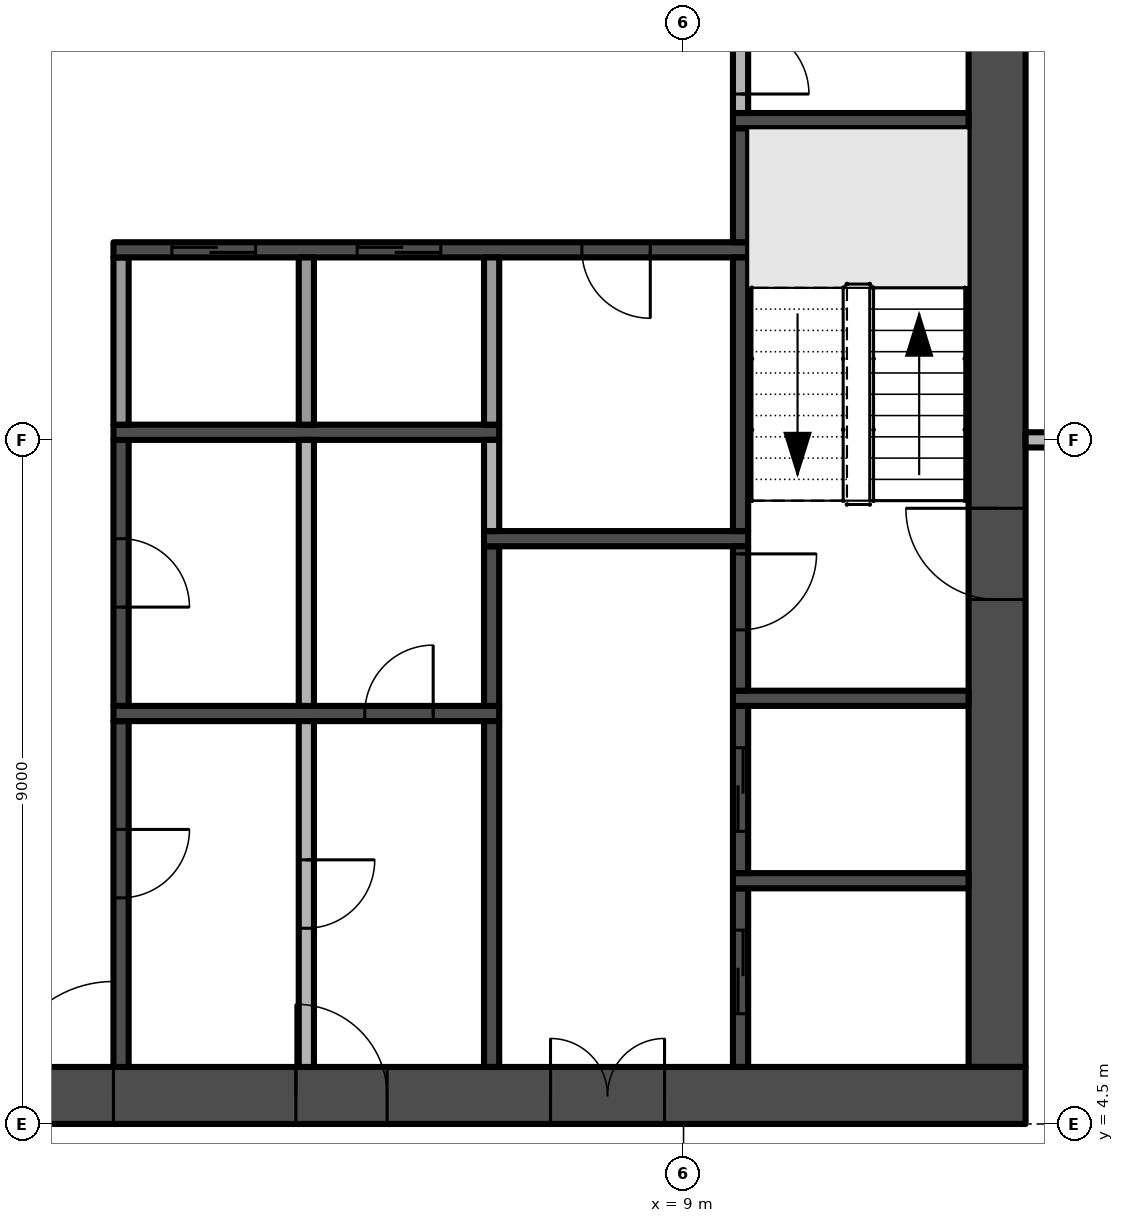
"""IFC4 building model, lengths in metres.
Left out: names, types, materials, properties, quantities, classifications, styles, units other than length and angle.
Written with IfcOpenShell. Run it as: python <this file> out.ifc"""

import sys

from ifc_helpers import new_model, si_unit, direction, frame, frame_2d, origin, place, context, subcontext, project, spatial, rectangle, extrude, element, fill, save


model = new_model("IFC4")
c1 = context("Model", 3, precision=1e-05, world=origin(), true_north=direction((0.0, 1.0)))
c2 = subcontext(c1, "Body", "Model", "MODEL_VIEW")
j1 = project(units=[si_unit("LENGTHUNIT", "METRE"), si_unit("PLANEANGLEUNIT", "RADIAN")], contexts=[c1])
p1 = place(None, origin())
s1 = spatial("IfcSite", under=j1, at=p1, CompositionType="ELEMENT")
p2 = place(p1, origin())
s2 = spatial("IfcBuilding", under=s1, at=p2, CompositionType="ELEMENT")
p3 = place(p2, frame((0.0, 0.0, 144.0)))
s3 = spatial("IfcBuildingStorey", under=s2, at=p3, CompositionType="ELEMENT", Elevation=144.0)
p4 = place(p3, frame((-13.5, 4.875, -0.3), z_axis=(0.0, 0.0, 1.0), x_axis=(1.0, 0.0, 0.0)))
e1 = element("IfcWall", 1, at=p4, inside=s3, PredefinedType="SHEAR", context=c2, shape_type="SweptSolid", body=[
    extrude(rectangle(XDim=27.0, YDim=0.75, at=frame_2d((13.5, 0.0))), origin(), (0.0, 0.0, 1.0), 3.8),
])
p5 = place(p4, frame((12.0, 0.0, 0.3)))
e2 = element("IfcOpeningElement", 2, at=p5, cuts=e1, PredefinedType="OPENING", context=c2, shape_type="SweptSolid", body=[
    extrude(rectangle(XDim=3.0, YDim=2.4, at=frame_2d((1.5, 1.2))), frame((0.0, 0.385, 0.0), z_axis=(0.0, -1.0, 0.0), x_axis=(1.0, 0.0, 0.0)), (0.0, 0.0, 1.0), 0.77),
])
p6 = place(p4, frame((4.9, 0.0, 0.3)))
e3 = element("IfcOpeningElement", 3, at=p6, cuts=e1, PredefinedType="OPENING", context=c2, shape_type="SweptSolid", body=[
    extrude(rectangle(XDim=1.2, YDim=2.2, at=frame_2d((0.6, 1.1))), frame((0.0, 0.385, 0.0), z_axis=(0.0, -1.0, 0.0), x_axis=(1.0, 0.0, 0.0)), (0.0, 0.0, 1.0), 0.77),
])
p7 = place(p4, frame((20.75, 0.0, 0.3)))
e4 = element("IfcOpeningElement", 4, at=p7, cuts=e1, PredefinedType="OPENING", context=c2, shape_type="SweptSolid", body=[
    extrude(rectangle(XDim=1.5, YDim=2.2, at=frame_2d((0.75, 1.1))), frame((0.0, 0.385, 0.0), z_axis=(0.0, -1.0, 0.0), x_axis=(1.0, 0.0, 0.0)), (0.0, 0.0, 1.0), 0.77),
])
p8 = place(p4, frame((17.4, 0.0, 0.3)))
e5 = element("IfcOpeningElement", 5, at=p8, cuts=e1, PredefinedType="OPENING", context=c2, shape_type="SweptSolid", body=[
    extrude(rectangle(XDim=1.2, YDim=2.2, at=frame_2d((0.6, 1.1))), frame((0.0, 0.385, 0.0), z_axis=(0.0, -1.0, 0.0), x_axis=(1.0, 0.0, 0.0)), (0.0, 0.0, 1.0), 0.77),
])
p9 = place(p3, frame((13.125, 5.25, -0.3), z_axis=(0.0, 0.0, 1.0), x_axis=(0.0, 1.0, 0.0)))
e6 = element("IfcWall", 6, at=p9, inside=s3, PredefinedType="SHEAR", context=c2, shape_type="SweptSolid", body=[
    extrude(rectangle(XDim=16.5, YDim=0.75, at=frame_2d((8.25, 0.0))), origin(), (0.0, 0.0, 1.0), 3.8),
])
p10 = place(p9, frame((6.15, 0.0, 0.3)))
e7 = element("IfcOpeningElement", 7, at=p10, cuts=e6, PredefinedType="OPENING", context=c2, shape_type="SweptSolid", body=[
    extrude(rectangle(XDim=1.2, YDim=2.2, at=frame_2d((0.6, 1.1))), frame((0.0, 0.385, 0.0), z_axis=(0.0, -1.0, 0.0), x_axis=(1.0, 0.0, 0.0)), (0.0, 0.0, 1.0), 0.77),
])
p11 = place(p3, frame((1.6, 9.8, 0.0), z_axis=(0.0, 0.0, 1.0), x_axis=(0.0, -1.0, 0.0)))
e8 = element("IfcWall", 8, at=p11, inside=s3, PredefinedType="SHEAR", context=c2, shape_type="SweptSolid", body=[
    extrude(rectangle(XDim=4.55, YDim=0.2, at=frame_2d((2.275, 0.0))), origin(), (0.0, 0.0, 1.0), 3.5),
])
p12 = place(p11, frame((1.425, 0.0, 0.0)))
e9 = element("IfcOpeningElement", 9, at=p12, cuts=e8, PredefinedType="OPENING", context=c2, shape_type="SweptSolid", body=[
    extrude(rectangle(XDim=0.9, YDim=2.1, at=frame_2d((0.45, 1.05))), frame((0.0, 0.11, 0.0), z_axis=(0.0, -1.0, 0.0), x_axis=(1.0, 0.0, 0.0)), (0.0, 0.0, 1.0), 0.22),
])
p13 = place(p3, frame((1.5, 9.9, 0.0), z_axis=(0.0, 0.0, 1.0), x_axis=(1.0, 0.0, 0.0)))
e10 = element("IfcWall", 10, at=p13, inside=s3, PredefinedType="SHEAR", context=c2, shape_type="SweptSolid", body=[
    extrude(rectangle(XDim=5.075, YDim=0.2, at=frame_2d((2.538, 0.0))), origin(), (0.0, 0.0, 1.0), 3.5),
])
p14 = place(p13, frame((3.306, 0.0, 0.0)))
e11 = element("IfcOpeningElement", 11, at=p14, cuts=e10, PredefinedType="OPENING", context=c2, shape_type="SweptSolid", body=[
    extrude(rectangle(XDim=0.9, YDim=2.1, at=frame_2d((0.45, 1.05))), frame((0.0, 0.11, 0.0), z_axis=(0.0, -1.0, 0.0), x_axis=(1.0, 0.0, 0.0)), (0.0, 0.0, 1.0), 0.22),
])
p15 = place(p3, frame((1.6, 13.5, 0.0), z_axis=(0.0, 0.0, 1.0), x_axis=(0.0, -1.0, 0.0)))
e12 = element("IfcWall", 12, at=p15, inside=s3, PredefinedType="SHEAR", context=c2, shape_type="SweptSolid", body=[
    extrude(rectangle(XDim=3.5, YDim=0.2, at=frame_2d((1.75, 0.0))), origin(), (0.0, 0.0, 1.0), 3.5),
])
p16 = place(p15, frame((1.3, 0.0, 0.0)))
e13 = element("IfcOpeningElement", 13, at=p16, cuts=e12, PredefinedType="OPENING", context=c2, shape_type="SweptSolid", body=[
    extrude(rectangle(XDim=0.9, YDim=2.1, at=frame_2d((0.45, 1.05))), frame((0.0, 0.11, 0.0), z_axis=(0.0, -1.0, 0.0), x_axis=(1.0, 0.0, 0.0)), (0.0, 0.0, 1.0), 0.22),
])
p17 = place(p3, frame((1.5, 13.6, 0.0), z_axis=(0.0, 0.0, 1.0), x_axis=(1.0, 0.0, 0.0)))
e14 = element("IfcWall", 14, at=p17, inside=s3, PredefinedType="SHEAR", context=c2, shape_type="SweptSolid", body=[
    extrude(rectangle(XDim=5.075, YDim=0.2, at=frame_2d((2.538, 0.0))), origin(), (0.0, 0.0, 1.0), 3.5),
])
p18 = place(p3, frame((1.6, 13.7, 0.0), z_axis=(0.0, 0.0, 1.0), x_axis=(0.0, 1.0, 0.0)))
e15 = element("IfcWall", 15, at=p18, inside=s3, PredefinedType="PARTITIONING", context=c2, shape_type="SweptSolid", body=[
    extrude(rectangle(XDim=2.2, YDim=0.2, at=frame_2d((1.1, 0.0))), origin(), (0.0, 0.0, 1.0), 3.5),
])
p19 = place(p3, frame((9.85, 16.0, 0.0), z_axis=(0.0, 0.0, 1.0), x_axis=(-1.0, 0.0, 0.0)))
e16 = element("IfcWall", 16, at=p19, inside=s3, PredefinedType="SHEAR", context=c2, shape_type="SweptSolid", body=[
    extrude(rectangle(XDim=8.35, YDim=0.2, at=frame_2d((4.175, 0.0))), origin(), (0.0, 0.0, 1.0), 3.5),
])
p20 = place(p19, frame((6.481, 0.0, 0.0)))
e17 = element("IfcOpeningElement", 17, at=p20, cuts=e16, PredefinedType="OPENING", context=c2, shape_type="SweptSolid", body=[
    extrude(rectangle(XDim=1.1, YDim=2.1, at=frame_2d((0.55, 1.05))), frame((0.0, 0.11, 0.0), z_axis=(0.0, -1.0, 0.0), x_axis=(1.0, 0.0, 0.0)), (0.0, 0.0, 1.0), 0.22),
])
p21 = place(p19, frame((4.044, 0.0, 0.0)))
e18 = element("IfcOpeningElement", 18, at=p21, cuts=e16, PredefinedType="OPENING", context=c2, shape_type="SweptSolid", body=[
    extrude(rectangle(XDim=1.1, YDim=2.1, at=frame_2d((0.55, 1.05))), frame((0.0, 0.11, 0.0), z_axis=(0.0, -1.0, 0.0), x_axis=(1.0, 0.0, 0.0)), (0.0, 0.0, 1.0), 0.22),
])
p22 = place(p19, frame((1.288, 0.0, 0.0)))
e19 = element("IfcOpeningElement", 19, at=p22, cuts=e16, PredefinedType="OPENING", context=c2, shape_type="SweptSolid", body=[
    extrude(rectangle(XDim=0.9, YDim=2.1, at=frame_2d((0.45, 1.05))), frame((0.0, 0.11, 0.0), z_axis=(0.0, -1.0, 0.0), x_axis=(1.0, 0.0, 0.0)), (0.0, 0.0, 1.0), 0.22),
])
p23 = place(p3, frame((4.037, 9.8, 0.0), z_axis=(0.0, 0.0, 1.0), x_axis=(0.0, -1.0, 0.0)))
e20 = element("IfcWall", 20, at=p23, inside=s3, PredefinedType="PARTITIONING", context=c2, shape_type="SweptSolid", body=[
    extrude(rectangle(XDim=4.55, YDim=0.2, at=frame_2d((2.275, 0.0))), origin(), (0.0, 0.0, 1.0), 3.5),
])
p24 = place(p23, frame((1.825, 0.0, 0.0)))
e21 = element("IfcOpeningElement", 21, at=p24, cuts=e20, PredefinedType="OPENING", context=c2, shape_type="SweptSolid", body=[
    extrude(rectangle(XDim=0.9, YDim=2.1, at=frame_2d((0.45, 1.05))), frame((0.0, 0.11, 0.0), z_axis=(0.0, -1.0, 0.0), x_axis=(1.0, 0.0, 0.0)), (0.0, 0.0, 1.0), 0.22),
])
p25 = place(p3, frame((4.037, 10.0, 0.0), z_axis=(0.0, 0.0, 1.0), x_axis=(0.0, 1.0, 0.0)))
e22 = element("IfcWall", 22, at=p25, inside=s3, PredefinedType="PARTITIONING", context=c2, shape_type="SweptSolid", body=[
    extrude(rectangle(XDim=3.5, YDim=0.2, at=frame_2d((1.75, 0.0))), origin(), (0.0, 0.0, 1.0), 3.5),
])
p26 = place(p3, frame((4.037, 13.7, 0.0), z_axis=(0.0, 0.0, 1.0), x_axis=(0.0, 1.0, 0.0)))
e23 = element("IfcWall", 23, at=p26, inside=s3, PredefinedType="PARTITIONING", context=c2, shape_type="SweptSolid", body=[
    extrude(rectangle(XDim=2.2, YDim=0.2, at=frame_2d((1.1, 0.0))), origin(), (0.0, 0.0, 1.0), 3.5),
])
p27 = place(p3, frame((6.475, 5.25, 0.0), z_axis=(0.0, 0.0, 1.0), x_axis=(0.0, 1.0, 0.0)))
e24 = element("IfcWall", 24, at=p27, inside=s3, PredefinedType="SHEAR", context=c2, shape_type="SweptSolid", body=[
    extrude(rectangle(XDim=4.55, YDim=0.2, at=frame_2d((2.275, 0.0))), origin(), (0.0, 0.0, 1.0), 3.5),
])
p28 = place(p3, frame((6.475, 10.0, 0.0), z_axis=(0.0, 0.0, 1.0), x_axis=(0.0, 1.0, 0.0)))
e25 = element("IfcWall", 25, at=p28, inside=s3, PredefinedType="SHEAR", context=c2, shape_type="SweptSolid", body=[
    extrude(rectangle(XDim=2.1, YDim=0.2, at=frame_2d((1.05, 0.0))), origin(), (0.0, 0.0, 1.0), 3.5),
])
p29 = place(p3, frame((6.375, 12.2, 0.0), z_axis=(0.0, 0.0, 1.0), x_axis=(1.0, 0.0, 0.0)))
e26 = element("IfcWall", 26, at=p29, inside=s3, PredefinedType="SHEAR", context=c2, shape_type="SweptSolid", body=[
    extrude(rectangle(XDim=3.475, YDim=0.2, at=frame_2d((1.738, 0.0))), origin(), (0.0, 0.0, 1.0), 3.5),
])
p30 = place(p3, frame((6.475, 12.3, 0.0), z_axis=(0.0, 0.0, 1.0), x_axis=(0.0, 1.0, 0.0)))
e27 = element("IfcWall", 27, at=p30, inside=s3, PredefinedType="PARTITIONING", context=c2, shape_type="SweptSolid", body=[
    extrude(rectangle(XDim=1.2, YDim=0.2, at=frame_2d((0.6, 0.0))), origin(), (0.0, 0.0, 1.0), 3.5),
])
p31 = place(p3, frame((6.475, 13.7, 0.0), z_axis=(0.0, 0.0, 1.0), x_axis=(0.0, 1.0, 0.0)))
e28 = element("IfcWall", 28, at=p31, inside=s3, PredefinedType="PARTITIONING", context=c2, shape_type="SweptSolid", body=[
    extrude(rectangle(XDim=2.2, YDim=0.2, at=frame_2d((1.1, 0.0))), origin(), (0.0, 0.0, 1.0), 3.5),
])
p32 = place(p3, frame((9.75, 5.25, 0.0), z_axis=(0.0, 0.0, 1.0), x_axis=(0.0, 1.0, 0.0)))
e29 = element("IfcWall", 29, at=p32, inside=s3, PredefinedType="SHEAR", context=c2, shape_type="SweptSolid", body=[
    extrude(rectangle(XDim=2.35, YDim=0.2, at=frame_2d((1.175, 0.0))), origin(), (0.0, 0.0, 1.0), 3.5),
])
p33 = place(p32, frame((0.7, 0.0, 0.0)))
e30 = element("IfcOpeningElement", 30, at=p33, cuts=e29, PredefinedType="OPENING", context=c2, shape_type="SweptSolid", body=[
    extrude(rectangle(XDim=1.1, YDim=2.1, at=frame_2d((0.55, 1.05))), frame((0.0, 0.11, 0.0), z_axis=(0.0, -1.0, 0.0), x_axis=(1.0, 0.0, 0.0)), (0.0, 0.0, 1.0), 0.22),
])
p34 = place(p3, frame((9.65, 7.7, 0.0), z_axis=(0.0, 0.0, 1.0), x_axis=(1.0, 0.0, 0.0)))
e31 = element("IfcWall", 31, at=p34, inside=s3, PredefinedType="SHEAR", context=c2, shape_type="SweptSolid", body=[
    extrude(rectangle(XDim=3.1, YDim=0.2, at=frame_2d((1.55, 0.0))), origin(), (0.0, 0.0, 1.0), 3.5),
])
p35 = place(p3, frame((9.75, 7.8, 0.0), z_axis=(0.0, 0.0, 1.0), x_axis=(0.0, 1.0, 0.0)))
e32 = element("IfcWall", 32, at=p35, inside=s3, PredefinedType="SHEAR", context=c2, shape_type="SweptSolid", body=[
    extrude(rectangle(XDim=2.2, YDim=0.2, at=frame_2d((1.1, 0.0))), origin(), (0.0, 0.0, 1.0), 3.5),
])
p36 = place(p35, frame((0.55, 0.0, 0.0)))
e33 = element("IfcOpeningElement", 33, at=p36, cuts=e32, PredefinedType="OPENING", context=c2, shape_type="SweptSolid", body=[
    extrude(rectangle(XDim=1.1, YDim=2.1, at=frame_2d((0.55, 1.05))), frame((0.0, 0.11, 0.0), z_axis=(0.0, -1.0, 0.0), x_axis=(1.0, 0.0, 0.0)), (0.0, 0.0, 1.0), 0.22),
])
p37 = place(p3, frame((9.65, 10.1, 0.0), z_axis=(0.0, 0.0, 1.0), x_axis=(1.0, 0.0, 0.0)))
e34 = element("IfcWall", 34, at=p37, inside=s3, PredefinedType="SHEAR", context=c2, shape_type="SweptSolid", body=[
    extrude(rectangle(XDim=3.1, YDim=0.2, at=frame_2d((1.55, 0.0))), origin(), (0.0, 0.0, 1.0), 3.5),
])
p38 = place(p3, frame((9.75, 12.1, 0.0), z_axis=(0.0, 0.0, 1.0), x_axis=(0.0, -1.0, 0.0)))
e35 = element("IfcWall", 35, at=p38, inside=s3, PredefinedType="SHEAR", context=c2, shape_type="SweptSolid", body=[
    extrude(rectangle(XDim=1.9, YDim=0.2, at=frame_2d((0.95, 0.0))), origin(), (0.0, 0.0, 1.0), 3.5),
])
p39 = place(p38, frame((0.1, 0.0, 0.0)))
e36 = element("IfcOpeningElement", 36, at=p39, cuts=e35, PredefinedType="OPENING", context=c2, shape_type="SweptSolid", body=[
    extrude(rectangle(XDim=1.0, YDim=2.2, at=frame_2d((0.5, 1.1))), frame((0.0, 0.11, 0.0), z_axis=(0.0, -1.0, 0.0), x_axis=(1.0, 0.0, 0.0)), (0.0, 0.0, 1.0), 0.22),
])
p40 = place(p3, frame((9.75, 12.3, 0.0), z_axis=(0.0, 0.0, 1.0), x_axis=(0.0, 1.0, 0.0)))
e37 = element("IfcWall", 37, at=p40, inside=s3, PredefinedType="SHEAR", context=c2, shape_type="SweptSolid", body=[
    extrude(rectangle(XDim=3.6, YDim=0.2, at=frame_2d((1.8, 0.0))), origin(), (0.0, 0.0, 1.0), 3.5),
])
p41 = place(p3, frame((9.75, 16.1, 0.0), z_axis=(0.0, 0.0, 1.0), x_axis=(0.0, 1.0, 0.0)))
e38 = element("IfcWall", 38, at=p41, inside=s3, PredefinedType="SHEAR", context=c2, shape_type="SweptSolid", body=[
    extrude(rectangle(XDim=1.5, YDim=0.2, at=frame_2d((0.75, 0.0))), origin(), (0.0, 0.0, 1.0), 3.5),
])
p42 = place(p3, frame((9.65, 17.7, 0.0), z_axis=(0.0, 0.0, 1.0), x_axis=(1.0, 0.0, 0.0)))
e39 = element("IfcWall", 39, at=p42, inside=s3, PredefinedType="SHEAR", context=c2, shape_type="SweptSolid", body=[
    extrude(rectangle(XDim=3.1, YDim=0.2, at=frame_2d((1.55, 0.0))), origin(), (0.0, 0.0, 1.0), 3.5),
])
p43 = place(p3, frame((9.75, 19.2, 0.0), z_axis=(0.0, 0.0, 1.0), x_axis=(0.0, -1.0, 0.0)))
e40 = element("IfcWall", 40, at=p43, inside=s3, PredefinedType="PARTITIONING", context=c2, shape_type="SweptSolid", body=[
    extrude(rectangle(XDim=1.4, YDim=0.2, at=frame_2d((0.7, 0.0))), origin(), (0.0, 0.0, 1.0), 3.5),
])
p44 = place(p43, frame((0.25, 0.0, 0.0)))
e41 = element("IfcOpeningElement", 41, at=p44, cuts=e40, PredefinedType="OPENING", context=c2, shape_type="SweptSolid", body=[
    extrude(rectangle(XDim=0.9, YDim=2.1, at=frame_2d((0.45, 1.05))), frame((0.0, 0.11, 0.0), z_axis=(0.0, -1.0, 0.0), x_axis=(1.0, 0.0, 0.0)), (0.0, 0.0, 1.0), 0.22),
])
p45 = place(p3, frame((13.5, 13.5, 0.0), z_axis=(0.0, 0.0, 1.0), x_axis=(1.0, 0.0, 0.0)))
e42 = element("IfcWall", 42, at=p45, inside=s3, PredefinedType="PARTITIONING", context=c2, shape_type="SweptSolid", body=[
    extrude(rectangle(XDim=3.875, YDim=0.2, at=frame_2d((1.938, 0.0))), origin(), (0.0, 0.0, 1.0), 3.5),
])
p46 = place(p45, frame((1.6, 0.0, 0.0)))
e43 = element("IfcOpeningElement", 43, at=p46, cuts=e42, PredefinedType="OPENING", context=c2, shape_type="SweptSolid", body=[
    extrude(rectangle(XDim=0.9, YDim=2.1, at=frame_2d((0.45, 1.05))), frame((0.0, 0.11, 0.0), z_axis=(0.0, -1.0, 0.0), x_axis=(1.0, 0.0, 0.0)), (0.0, 0.0, 1.0), 0.22),
])
p47 = place(p5, frame((3.0, 0.0, 0.0), z_axis=(0.0, 0.0, 1.0), x_axis=(-1.0, 0.0, 0.0)))
e44 = element("IfcDoor", 44, at=p47, inside=s3, OperationType="DOUBLE_DOOR_SINGLE_SWING", PredefinedType="DOOR", context=c2, shape_type="SweptSolid", body=[
    extrude(rectangle(XDim=3.0, YDim=2.4, at=frame_2d((1.5, 1.2))), frame((0.0, 0.025, 0.0), z_axis=(0.0, -1.0, 0.0), x_axis=(1.0, 0.0, 0.0)), (0.0, 0.0, 1.0), 0.05),
])
fill(e2, e44)
p48 = place(p10, frame((1.2, 0.0, 0.0), z_axis=(0.0, 0.0, 1.0), x_axis=(-1.0, 0.0, 0.0)))
e45 = element("IfcDoor", 45, at=p48, inside=s3, OperationType="SINGLE_SWING_LEFT", PredefinedType="DOOR", context=c2, shape_type="SweptSolid", body=[
    extrude(rectangle(XDim=1.2, YDim=2.2, at=frame_2d((0.6, 1.1))), frame((0.0, 0.025, 0.0), z_axis=(0.0, -1.0, 0.0), x_axis=(1.0, 0.0, 0.0)), (0.0, 0.0, 1.0), 0.05),
])
fill(e7, e45)
p49 = place(p7, frame((1.5, 0.0, 0.0), z_axis=(0.0, 0.0, 1.0), x_axis=(-1.0, 0.0, 0.0)))
e46 = element("IfcDoor", 46, at=p49, inside=s3, OperationType="DOUBLE_DOOR_SINGLE_SWING", PredefinedType="DOOR", context=c2, shape_type="SweptSolid", body=[
    extrude(rectangle(XDim=1.5, YDim=2.2, at=frame_2d((0.75, 1.1))), frame((0.0, 0.025, 0.0), z_axis=(0.0, -1.0, 0.0), x_axis=(1.0, 0.0, 0.0)), (0.0, 0.0, 1.0), 0.05),
])
fill(e4, e46)
p50 = place(p8, frame((1.2, 0.0, 0.0), z_axis=(0.0, 0.0, 1.0), x_axis=(-1.0, 0.0, 0.0)))
e47 = element("IfcDoor", 47, at=p50, inside=s3, OperationType="SINGLE_SWING_RIGHT", PredefinedType="DOOR", context=c2, shape_type="SweptSolid", body=[
    extrude(rectangle(XDim=1.2, YDim=2.2, at=frame_2d((0.6, 1.1))), frame((0.0, 0.025, 0.0), z_axis=(0.0, -1.0, 0.0), x_axis=(1.0, 0.0, 0.0)), (0.0, 0.0, 1.0), 0.05),
])
fill(e5, e47)
p51 = place(p39, origin())
e48 = element("IfcDoor", 48, at=p51, inside=s3, OperationType="SINGLE_SWING_LEFT", PredefinedType="DOOR", context=c2, shape_type="SweptSolid", body=[
    extrude(rectangle(XDim=1.0, YDim=2.2, at=frame_2d((0.5, 1.1))), frame((0.0, 0.025, 0.0), z_axis=(0.0, -1.0, 0.0), x_axis=(1.0, 0.0, 0.0)), (0.0, 0.0, 1.0), 0.05),
])
fill(e36, e48)
p52 = place(p20, origin())
e49 = element("IfcDoor", 49, at=p52, inside=s3, OperationType="SLIDING_TO_RIGHT", PredefinedType="DOOR", context=c2, shape_type="SweptSolid", body=[
    extrude(rectangle(XDim=1.1, YDim=2.1, at=frame_2d((0.55, 1.05))), frame((0.0, 0.025, 0.0), z_axis=(0.0, -1.0, 0.0), x_axis=(1.0, 0.0, 0.0)), (0.0, 0.0, 1.0), 0.05),
])
fill(e17, e49)
p53 = place(p21, origin())
e50 = element("IfcDoor", 50, at=p53, inside=s3, OperationType="SLIDING_TO_RIGHT", PredefinedType="DOOR", context=c2, shape_type="SweptSolid", body=[
    extrude(rectangle(XDim=1.1, YDim=2.1, at=frame_2d((0.55, 1.05))), frame((0.0, 0.025, 0.0), z_axis=(0.0, -1.0, 0.0), x_axis=(1.0, 0.0, 0.0)), (0.0, 0.0, 1.0), 0.05),
])
fill(e18, e50)
p54 = place(p33, origin())
e51 = element("IfcDoor", 51, at=p54, inside=s3, OperationType="SLIDING_TO_RIGHT", PredefinedType="DOOR", context=c2, shape_type="SweptSolid", body=[
    extrude(rectangle(XDim=1.1, YDim=2.1, at=frame_2d((0.55, 1.05))), frame((0.0, 0.025, 0.0), z_axis=(0.0, -1.0, 0.0), x_axis=(1.0, 0.0, 0.0)), (0.0, 0.0, 1.0), 0.05),
])
fill(e30, e51)
p55 = place(p36, origin())
e52 = element("IfcDoor", 52, at=p55, inside=s3, OperationType="SLIDING_TO_RIGHT", PredefinedType="DOOR", context=c2, shape_type="SweptSolid", body=[
    extrude(rectangle(XDim=1.1, YDim=2.1, at=frame_2d((0.55, 1.05))), frame((0.0, 0.025, 0.0), z_axis=(0.0, -1.0, 0.0), x_axis=(1.0, 0.0, 0.0)), (0.0, 0.0, 1.0), 0.05),
])
fill(e33, e52)
p56 = place(p12, origin())
e53 = element("IfcDoor", 53, at=p56, inside=s3, OperationType="SINGLE_SWING_LEFT", PredefinedType="DOOR", context=c2, shape_type="SweptSolid", body=[
    extrude(rectangle(XDim=0.9, YDim=2.1, at=frame_2d((0.45, 1.05))), frame((0.0, 0.025, 0.0), z_axis=(0.0, -1.0, 0.0), x_axis=(1.0, 0.0, 0.0)), (0.0, 0.0, 1.0), 0.05),
])
fill(e9, e53)
p57 = place(p24, origin())
e54 = element("IfcDoor", 54, at=p57, inside=s3, OperationType="SINGLE_SWING_LEFT", PredefinedType="DOOR", context=c2, shape_type="SweptSolid", body=[
    extrude(rectangle(XDim=0.9, YDim=2.1, at=frame_2d((0.45, 1.05))), frame((0.0, 0.025, 0.0), z_axis=(0.0, -1.0, 0.0), x_axis=(1.0, 0.0, 0.0)), (0.0, 0.0, 1.0), 0.05),
])
fill(e21, e54)
p58 = place(p16, origin())
e55 = element("IfcDoor", 55, at=p58, inside=s3, OperationType="SINGLE_SWING_RIGHT", PredefinedType="DOOR", context=c2, shape_type="SweptSolid", body=[
    extrude(rectangle(XDim=0.9, YDim=2.1, at=frame_2d((0.45, 1.05))), frame((0.0, 0.025, 0.0), z_axis=(0.0, -1.0, 0.0), x_axis=(1.0, 0.0, 0.0)), (0.0, 0.0, 1.0), 0.05),
])
fill(e13, e55)
p59 = place(p14, origin())
e56 = element("IfcDoor", 56, at=p59, inside=s3, OperationType="SINGLE_SWING_RIGHT", PredefinedType="DOOR", context=c2, shape_type="SweptSolid", body=[
    extrude(rectangle(XDim=0.9, YDim=2.1, at=frame_2d((0.45, 1.05))), frame((0.0, 0.025, 0.0), z_axis=(0.0, -1.0, 0.0), x_axis=(1.0, 0.0, 0.0)), (0.0, 0.0, 1.0), 0.05),
])
fill(e11, e56)
p60 = place(p22, origin())
e57 = element("IfcDoor", 57, at=p60, inside=s3, OperationType="SINGLE_SWING_LEFT", PredefinedType="DOOR", context=c2, shape_type="SweptSolid", body=[
    extrude(rectangle(XDim=0.9, YDim=2.1, at=frame_2d((0.45, 1.05))), frame((0.0, 0.025, 0.0), z_axis=(0.0, -1.0, 0.0), x_axis=(1.0, 0.0, 0.0)), (0.0, 0.0, 1.0), 0.05),
])
fill(e19, e57)
p61 = place(p44, origin())
e58 = element("IfcDoor", 58, at=p61, inside=s3, OperationType="SINGLE_SWING_RIGHT", PredefinedType="DOOR", context=c2, shape_type="SweptSolid", body=[
    extrude(rectangle(XDim=0.9, YDim=2.1, at=frame_2d((0.45, 1.05))), frame((0.0, 0.025, 0.0), z_axis=(0.0, -1.0, 0.0), x_axis=(1.0, 0.0, 0.0)), (0.0, 0.0, 1.0), 0.05),
])
fill(e41, e58)
save(model, sys.argv[1])
